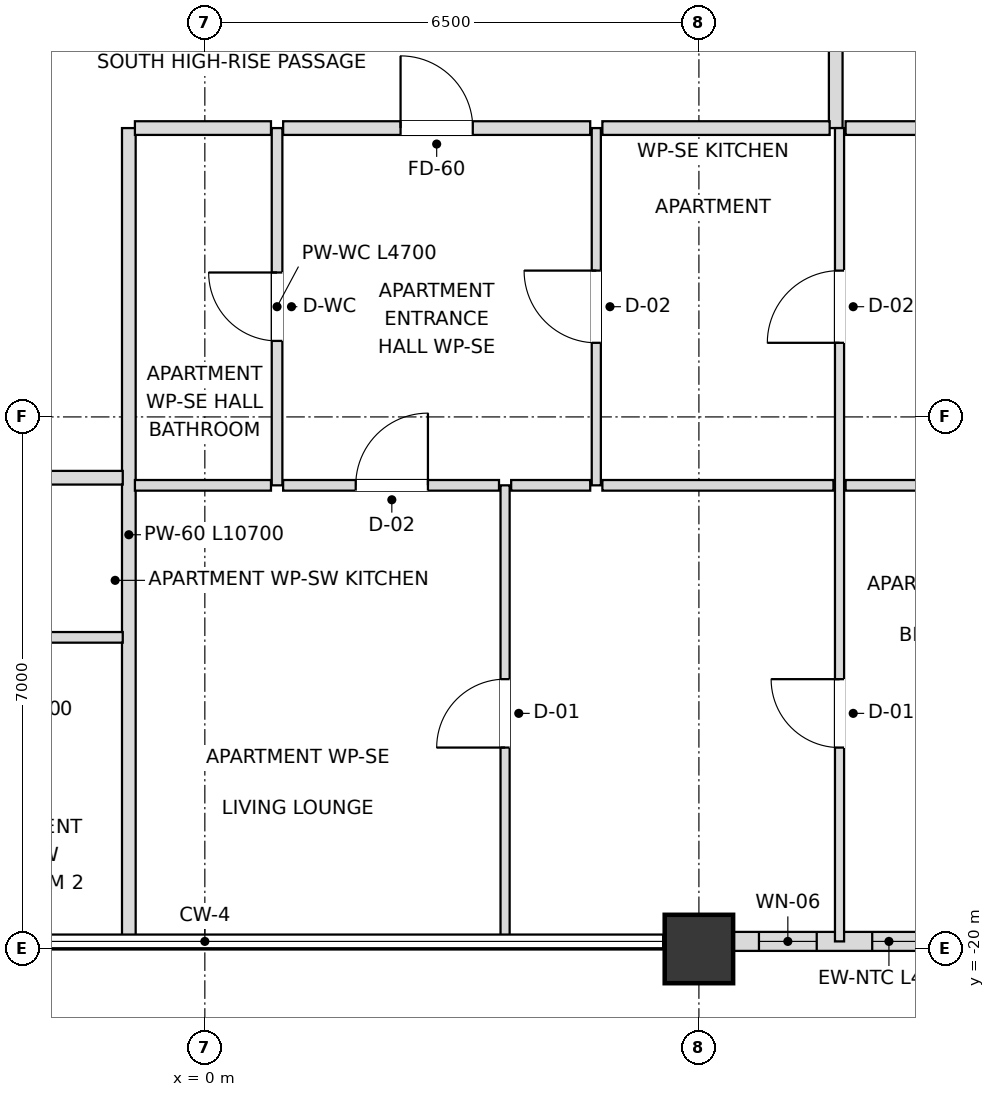
"""IFC4 building model, lengths in metres.
Left out: names, types, materials, properties, quantities, classifications, styles, units other than length and angle.
Written with IfcOpenShell. Run it as: python <this file> out.ifc"""

import sys

from ifc_helpers import new_model, si_unit, direction, frame, frame_2d, origin, origin_2d, place, context, subcontext, project, spatial, rectangle, extrude, element, fill, save


model = new_model("IFC4")
c1 = context("Model", 3, precision=1e-05, world=origin(), true_north=direction((0.0, 1.0)))
c2 = subcontext(c1, "Body", "Model", "MODEL_VIEW")
j1 = project(units=[si_unit("LENGTHUNIT", "METRE"), si_unit("PLANEANGLEUNIT", "RADIAN")], contexts=[c1])
p1 = place(None, origin())
s1 = spatial("IfcSite", under=j1, at=p1, CompositionType="ELEMENT")
p2 = place(p1, origin())
s2 = spatial("IfcBuilding", under=s1, at=p2, CompositionType="ELEMENT")
p3 = place(p2, frame((0.0, 0.0, 265.5)))
s3 = spatial("IfcBuildingStorey", under=s2, at=p3, CompositionType="ELEMENT", Elevation=265.5)
p4 = place(p3, frame((6.5, -20.0, 0.0), z_axis=(0.0, 0.0, 1.0), x_axis=(1.0, 0.0, 0.0)))
e1 = element("IfcColumn", 1, at=p4, inside=s3, PredefinedType="USERDEFINED", context=c2, shape_type="SweptSolid", body=[
    extrude(rectangle(XDim=0.9, YDim=0.9, at=origin_2d()), origin(), (0.0, 0.0, 1.0), 3.6),
])
p5 = place(p3, frame((6.945, -19.9, 0.0), z_axis=(0.0, 0.0, 1.0), x_axis=(1.0, 0.0, 0.0)))
e2 = element("IfcWall", 2, at=p5, inside=s3, PredefinedType="SOLIDWALL", context=c2, shape_type="SweptSolid", body=[
    extrude(rectangle(XDim=4.11, YDim=0.25, at=frame_2d((2.055, 0.0))), origin(), (0.0, 0.0, 1.0), 2.748),
])
p6 = place(p5, frame((0.345, 0.0, 0.72)))
e3 = element("IfcOpeningElement", 3, at=p6, cuts=e2, PredefinedType="OPENING", context=c2, shape_type="SweptSolid", body=[
    extrude(rectangle(XDim=0.76, YDim=1.68, at=frame_2d((0.38, 0.84))), frame((0.0, 0.135, 0.0), z_axis=(0.0, -1.0, 0.0), x_axis=(1.0, 0.0, 0.0)), (0.0, 0.0, 1.0), 0.27),
])
p7 = place(p5, frame((1.835, 0.0, 0.72)))
e4 = element("IfcOpeningElement", 4, at=p7, cuts=e2, PredefinedType="OPENING", context=c2, shape_type="SweptSolid", body=[
    extrude(rectangle(XDim=1.8, YDim=1.68, at=frame_2d((0.9, 0.84))), frame((0.0, 0.135, 0.0), z_axis=(0.0, -1.0, 0.0), x_axis=(1.0, 0.0, 0.0)), (0.0, 0.0, 1.0), 0.27),
])
p8 = place(p3, frame((-1.0, -19.9, 0.0), z_axis=(0.0, 0.0, 1.0), x_axis=(0.0, 1.0, 0.0)))
e5 = element("IfcWall", 5, at=p8, inside=s3, PredefinedType="PARTITIONING", context=c2, shape_type="SweptSolid", body=[
    extrude(rectangle(XDim=10.7, YDim=0.18, at=frame_2d((5.35, 0.0))), origin(), (0.0, 0.0, 1.0), 3.018),
])
p9 = place(p3, frame((0.95, -13.9, 0.0), z_axis=(0.0, 0.0, 1.0), x_axis=(0.0, 1.0, 0.0)))
e6 = element("IfcWall", 6, at=p9, inside=s3, PredefinedType="PARTITIONING", context=c2, shape_type="SweptSolid", body=[
    extrude(rectangle(XDim=4.7, YDim=0.14, at=frame_2d((2.35, 0.0))), origin(), (0.0, 0.0, 1.0), 3.38),
])
p10 = place(p9, frame((1.9, 0.0, 0.0)))
e7 = element("IfcOpeningElement", 7, at=p10, cuts=e6, PredefinedType="OPENING", context=c2, shape_type="SweptSolid", body=[
    extrude(rectangle(XDim=0.9, YDim=2.1, at=frame_2d((0.45, 1.05))), frame((0.0, 0.08, 0.0), z_axis=(0.0, -1.0, 0.0), x_axis=(1.0, 0.0, 0.0)), (0.0, 0.0, 1.0), 0.16),
])
p11 = place(p3, frame((3.95, -19.9, 0.0), z_axis=(0.0, 0.0, 1.0), x_axis=(0.0, 1.0, 0.0)))
e8 = element("IfcWall", 8, at=p11, inside=s3, PredefinedType="PARTITIONING", context=c2, shape_type="SweptSolid", body=[
    extrude(rectangle(XDim=6.0, YDim=0.12, at=frame_2d((3.0, 0.0))), origin(), (0.0, 0.0, 1.0), 3.018),
])
p12 = place(p11, frame((2.55, 0.0, 0.0)))
e9 = element("IfcOpeningElement", 9, at=p12, cuts=e8, PredefinedType="OPENING", context=c2, shape_type="SweptSolid", body=[
    extrude(rectangle(XDim=0.9, YDim=2.1, at=frame_2d((0.45, 1.05))), frame((0.0, 0.07, 0.0), z_axis=(0.0, -1.0, 0.0), x_axis=(1.0, 0.0, 0.0)), (0.0, 0.0, 1.0), 0.14),
])
p13 = place(p3, frame((5.15, -13.9, 0.0), z_axis=(0.0, 0.0, 1.0), x_axis=(0.0, 1.0, 0.0)))
e10 = element("IfcWall", 10, at=p13, inside=s3, PredefinedType="PARTITIONING", context=c2, shape_type="SweptSolid", body=[
    extrude(rectangle(XDim=4.7, YDim=0.12, at=frame_2d((2.35, 0.0))), origin(), (0.0, 0.0, 1.0), 3.38),
])
p14 = place(p13, frame((1.875, 0.0, 0.0)))
e11 = element("IfcOpeningElement", 11, at=p14, cuts=e10, PredefinedType="OPENING", context=c2, shape_type="SweptSolid", body=[
    extrude(rectangle(XDim=0.95, YDim=2.1, at=frame_2d((0.475, 1.05))), frame((0.0, 0.07, 0.0), z_axis=(0.0, -1.0, 0.0), x_axis=(1.0, 0.0, 0.0)), (0.0, 0.0, 1.0), 0.14),
])
p15 = place(p3, frame((8.3, -9.2, 0.0), z_axis=(0.0, 0.0, 1.0), x_axis=(0.0, 1.0, 0.0)))
e12 = element("IfcWall", 12, at=p15, inside=s3, PredefinedType="PARTITIONING", context=c2, shape_type="SweptSolid", body=[
    extrude(rectangle(XDim=5.4, YDim=0.18, at=frame_2d((2.7, 0.0))), origin(), (0.0, 0.0, 1.0), 2.826),
])
p16 = place(p15, frame((3.125, 0.0, 0.0)))
e13 = element("IfcOpeningElement", 13, at=p16, cuts=e12, PredefinedType="OPENING", context=c2, shape_type="SweptSolid", body=[
    extrude(rectangle(XDim=0.95, YDim=2.15, at=frame_2d((0.475, 1.075))), frame((0.0, 0.1, 0.0), z_axis=(0.0, -1.0, 0.0), x_axis=(1.0, 0.0, 0.0)), (0.0, 0.0, 1.0), 0.2),
])
p17 = place(p3, frame((8.35, -19.9, 0.0), z_axis=(0.0, 0.0, 1.0), x_axis=(0.0, 1.0, 0.0)))
e14 = element("IfcWall", 14, at=p17, inside=s3, PredefinedType="PARTITIONING", context=c2, shape_type="SweptSolid", body=[
    extrude(rectangle(XDim=10.7, YDim=0.12, at=frame_2d((5.35, 0.0))), origin(), (0.0, 0.0, 1.0), 2.826),
])
p18 = place(p17, frame((7.875, 0.0, 0.0)))
e15 = element("IfcOpeningElement", 15, at=p18, cuts=e14, PredefinedType="OPENING", context=c2, shape_type="SweptSolid", body=[
    extrude(rectangle(XDim=0.95, YDim=2.1, at=frame_2d((0.475, 1.05))), frame((0.0, 0.07, 0.0), z_axis=(0.0, -1.0, 0.0), x_axis=(1.0, 0.0, 0.0)), (0.0, 0.0, 1.0), 0.14),
])
p19 = place(p17, frame((2.55, 0.0, 0.0)))
e16 = element("IfcOpeningElement", 16, at=p19, cuts=e14, PredefinedType="OPENING", context=c2, shape_type="SweptSolid", body=[
    extrude(rectangle(XDim=0.9, YDim=2.1, at=frame_2d((0.45, 1.05))), frame((0.0, 0.07, 0.0), z_axis=(0.0, -1.0, 0.0), x_axis=(1.0, 0.0, 0.0)), (0.0, 0.0, 1.0), 0.14),
])
p20 = place(p3, frame((-3.62, -15.9, 0.0), z_axis=(0.0, 0.0, 1.0), x_axis=(1.0, 0.0, 0.0)))
e17 = element("IfcWall", 17, at=p20, inside=s3, PredefinedType="PARTITIONING", context=c2, shape_type="SweptSolid", body=[
    extrude(rectangle(XDim=2.54, YDim=0.14, at=frame_2d((1.27, 0.0))), origin(), (0.0, 0.0, 1.0), 3.38),
])
p21 = place(p3, frame((-0.92, -13.9, 0.0), z_axis=(0.0, 0.0, 1.0), x_axis=(1.0, 0.0, 0.0)))
e18 = element("IfcWall", 18, at=p21, inside=s3, PredefinedType="PARTITIONING", context=c2, shape_type="SweptSolid", body=[
    extrude(rectangle(XDim=1.79, YDim=0.14, at=frame_2d((0.895, 0.0))), origin(), (0.0, 0.0, 1.0), 3.38),
])
p22 = place(p3, frame((1.03, -13.9, 0.0), z_axis=(0.0, 0.0, 1.0), x_axis=(1.0, 0.0, 0.0)))
e19 = element("IfcWall", 19, at=p22, inside=s3, PredefinedType="PARTITIONING", context=c2, shape_type="SweptSolid", body=[
    extrude(rectangle(XDim=2.84, YDim=0.14, at=frame_2d((1.42, 0.0))), origin(), (0.0, 0.0, 1.0), 3.38),
])
p23 = place(p22, frame((0.955, 0.0, 0.0)))
e20 = element("IfcOpeningElement", 20, at=p23, cuts=e19, PredefinedType="OPENING", context=c2, shape_type="SweptSolid", body=[
    extrude(rectangle(XDim=0.95, YDim=2.1, at=frame_2d((0.475, 1.05))), frame((0.0, 0.08, 0.0), z_axis=(0.0, -1.0, 0.0), x_axis=(1.0, 0.0, 0.0)), (0.0, 0.0, 1.0), 0.16),
])
p24 = place(p3, frame((4.03, -13.9, 0.0), z_axis=(0.0, 0.0, 1.0), x_axis=(1.0, 0.0, 0.0)))
e21 = element("IfcWall", 21, at=p24, inside=s3, PredefinedType="PARTITIONING", context=c2, shape_type="SweptSolid", body=[
    extrude(rectangle(XDim=1.04, YDim=0.14, at=frame_2d((0.52, 0.0))), origin(), (0.0, 0.0, 1.0), 3.38),
])
p25 = place(p3, frame((5.23, -13.9, 0.0), z_axis=(0.0, 0.0, 1.0), x_axis=(1.0, 0.0, 0.0)))
e22 = element("IfcWall", 22, at=p25, inside=s3, PredefinedType="PARTITIONING", context=c2, shape_type="SweptSolid", body=[
    extrude(rectangle(XDim=3.04, YDim=0.14, at=frame_2d((1.52, 0.0))), origin(), (0.0, 0.0, 1.0), 2.826),
])
p26 = place(p3, frame((8.43, -13.9, 0.0), z_axis=(0.0, 0.0, 1.0), x_axis=(1.0, 0.0, 0.0)))
e23 = element("IfcWall", 23, at=p26, inside=s3, PredefinedType="PARTITIONING", context=c2, shape_type="SweptSolid", body=[
    extrude(rectangle(XDim=2.89, YDim=0.14, at=frame_2d((1.445, 0.0))), origin(), (0.0, 0.0, 1.0), 3.38),
])
p27 = place(p3, frame((-3.62, -13.8, 0.0), z_axis=(0.0, 0.0, 1.0), x_axis=(1.0, 0.0, 0.0)))
e24 = element("IfcWall", 24, at=p27, inside=s3, PredefinedType="PARTITIONING", context=c2, shape_type="SweptSolid", body=[
    extrude(rectangle(XDim=2.54, YDim=0.18, at=frame_2d((1.27, 0.0))), origin(), (0.0, 0.0, 1.0), 3.38),
])
p28 = place(p3, frame((-0.92, -9.2, 0.0), z_axis=(0.0, 0.0, 1.0), x_axis=(1.0, 0.0, 0.0)))
e25 = element("IfcWall", 25, at=p28, inside=s3, PredefinedType="PARTITIONING", context=c2, shape_type="SweptSolid", body=[
    extrude(rectangle(XDim=1.79, YDim=0.18, at=frame_2d((0.895, 0.0))), origin(), (0.0, 0.0, 1.0), 3.38),
])
p29 = place(p3, frame((1.03, -9.2, 0.0), z_axis=(0.0, 0.0, 1.0), x_axis=(1.0, 0.0, 0.0)))
e26 = element("IfcWall", 26, at=p29, inside=s3, PredefinedType="PARTITIONING", context=c2, shape_type="SweptSolid", body=[
    extrude(rectangle(XDim=4.04, YDim=0.18, at=frame_2d((2.02, 0.0))), origin(), (0.0, 0.0, 1.0), 3.38),
])
p30 = place(p29, frame((1.545, 0.0, 0.0)))
e27 = element("IfcOpeningElement", 27, at=p30, cuts=e26, PredefinedType="OPENING", context=c2, shape_type="SweptSolid", body=[
    extrude(rectangle(XDim=0.95, YDim=2.15, at=frame_2d((0.475, 1.075))), frame((0.0, 0.1, 0.0), z_axis=(0.0, -1.0, 0.0), x_axis=(1.0, 0.0, 0.0)), (0.0, 0.0, 1.0), 0.2),
])
p31 = place(p3, frame((5.23, -9.2, 0.0), z_axis=(0.0, 0.0, 1.0), x_axis=(1.0, 0.0, 0.0)))
e28 = element("IfcWall", 28, at=p31, inside=s3, PredefinedType="PARTITIONING", context=c2, shape_type="SweptSolid", body=[
    extrude(rectangle(XDim=2.99, YDim=0.18, at=frame_2d((1.495, 0.0))), origin(), (0.0, 0.0, 1.0), 2.826),
])
p32 = place(p3, frame((8.43, -9.2, 0.0), z_axis=(0.0, 0.0, 1.0), x_axis=(1.0, 0.0, 0.0)))
e29 = element("IfcWall", 29, at=p32, inside=s3, PredefinedType="PARTITIONING", context=c2, shape_type="SweptSolid", body=[
    extrude(rectangle(XDim=2.89, YDim=0.18, at=frame_2d((1.445, 0.0))), origin(), (0.0, 0.0, 1.0), 3.38),
])
p33 = place(p6, origin())
e30 = element("IfcWindow", 30, at=p33, inside=s3, PartitioningType="SINGLE_PANEL", PredefinedType="WINDOW", context=c2, shape_type="SweptSolid", body=[
    extrude(rectangle(XDim=0.76, YDim=1.68, at=frame_2d((0.38, 0.84))), frame((0.0, 0.03, 0.0), z_axis=(0.0, -1.0, 0.0), x_axis=(1.0, 0.0, 0.0)), (0.0, 0.0, 1.0), 0.06),
])
fill(e3, e30)
p34 = place(p7, origin())
e31 = element("IfcWindow", 31, at=p34, inside=s3, PartitioningType="SINGLE_PANEL", PredefinedType="WINDOW", context=c2, shape_type="SweptSolid", body=[
    extrude(rectangle(XDim=1.8, YDim=1.68, at=frame_2d((0.9, 0.84))), frame((0.0, 0.03, 0.0), z_axis=(0.0, -1.0, 0.0), x_axis=(1.0, 0.0, 0.0)), (0.0, 0.0, 1.0), 0.06),
])
fill(e4, e31)
p35 = place(p10, origin())
e32 = element("IfcDoor", 32, at=p35, inside=s3, OperationType="SINGLE_SWING_RIGHT", PredefinedType="DOOR", context=c2, shape_type="SweptSolid", body=[
    extrude(rectangle(XDim=0.9, YDim=2.1, at=frame_2d((0.45, 1.05))), frame((0.0, 0.025, 0.0), z_axis=(0.0, -1.0, 0.0), x_axis=(1.0, 0.0, 0.0)), (0.0, 0.0, 1.0), 0.05),
])
fill(e7, e32)
p36 = place(p30, origin())
e33 = element("IfcDoor", 33, at=p36, inside=s3, OperationType="SINGLE_SWING_LEFT", PredefinedType="DOOR", context=c2, shape_type="SweptSolid", body=[
    extrude(rectangle(XDim=0.95, YDim=2.15, at=frame_2d((0.475, 1.075))), frame((0.0, 0.025, 0.0), z_axis=(0.0, -1.0, 0.0), x_axis=(1.0, 0.0, 0.0)), (0.0, 0.0, 1.0), 0.05),
])
fill(e27, e33)
p37 = place(p14, origin())
e34 = element("IfcDoor", 34, at=p37, inside=s3, OperationType="SINGLE_SWING_RIGHT", PredefinedType="DOOR", context=c2, shape_type="SweptSolid", body=[
    extrude(rectangle(XDim=0.95, YDim=2.1, at=frame_2d((0.475, 1.05))), frame((0.0, 0.025, 0.0), z_axis=(0.0, -1.0, 0.0), x_axis=(1.0, 0.0, 0.0)), (0.0, 0.0, 1.0), 0.05),
])
fill(e11, e34)
p38 = place(p18, origin())
e35 = element("IfcDoor", 35, at=p38, inside=s3, OperationType="SINGLE_SWING_LEFT", PredefinedType="DOOR", context=c2, shape_type="SweptSolid", body=[
    extrude(rectangle(XDim=0.95, YDim=2.1, at=frame_2d((0.475, 1.05))), frame((0.0, 0.025, 0.0), z_axis=(0.0, -1.0, 0.0), x_axis=(1.0, 0.0, 0.0)), (0.0, 0.0, 1.0), 0.05),
])
fill(e15, e35)
p39 = place(p23, origin())
e36 = element("IfcDoor", 36, at=p39, inside=s3, OperationType="SINGLE_SWING_RIGHT", PredefinedType="DOOR", context=c2, shape_type="SweptSolid", body=[
    extrude(rectangle(XDim=0.95, YDim=2.1, at=frame_2d((0.475, 1.05))), frame((0.0, 0.025, 0.0), z_axis=(0.0, -1.0, 0.0), x_axis=(1.0, 0.0, 0.0)), (0.0, 0.0, 1.0), 0.05),
])
fill(e20, e36)
p40 = place(p12, origin())
e37 = element("IfcDoor", 37, at=p40, inside=s3, OperationType="SINGLE_SWING_LEFT", PredefinedType="DOOR", context=c2, shape_type="SweptSolid", body=[
    extrude(rectangle(XDim=0.9, YDim=2.1, at=frame_2d((0.45, 1.05))), frame((0.0, 0.025, 0.0), z_axis=(0.0, -1.0, 0.0), x_axis=(1.0, 0.0, 0.0)), (0.0, 0.0, 1.0), 0.05),
])
fill(e9, e37)
p41 = place(p19, origin())
e38 = element("IfcDoor", 38, at=p41, inside=s3, OperationType="SINGLE_SWING_RIGHT", PredefinedType="DOOR", context=c2, shape_type="SweptSolid", body=[
    extrude(rectangle(XDim=0.9, YDim=2.1, at=frame_2d((0.45, 1.05))), frame((0.0, 0.025, 0.0), z_axis=(0.0, -1.0, 0.0), x_axis=(1.0, 0.0, 0.0)), (0.0, 0.0, 1.0), 0.05),
])
fill(e16, e38)
save(model, sys.argv[1])
